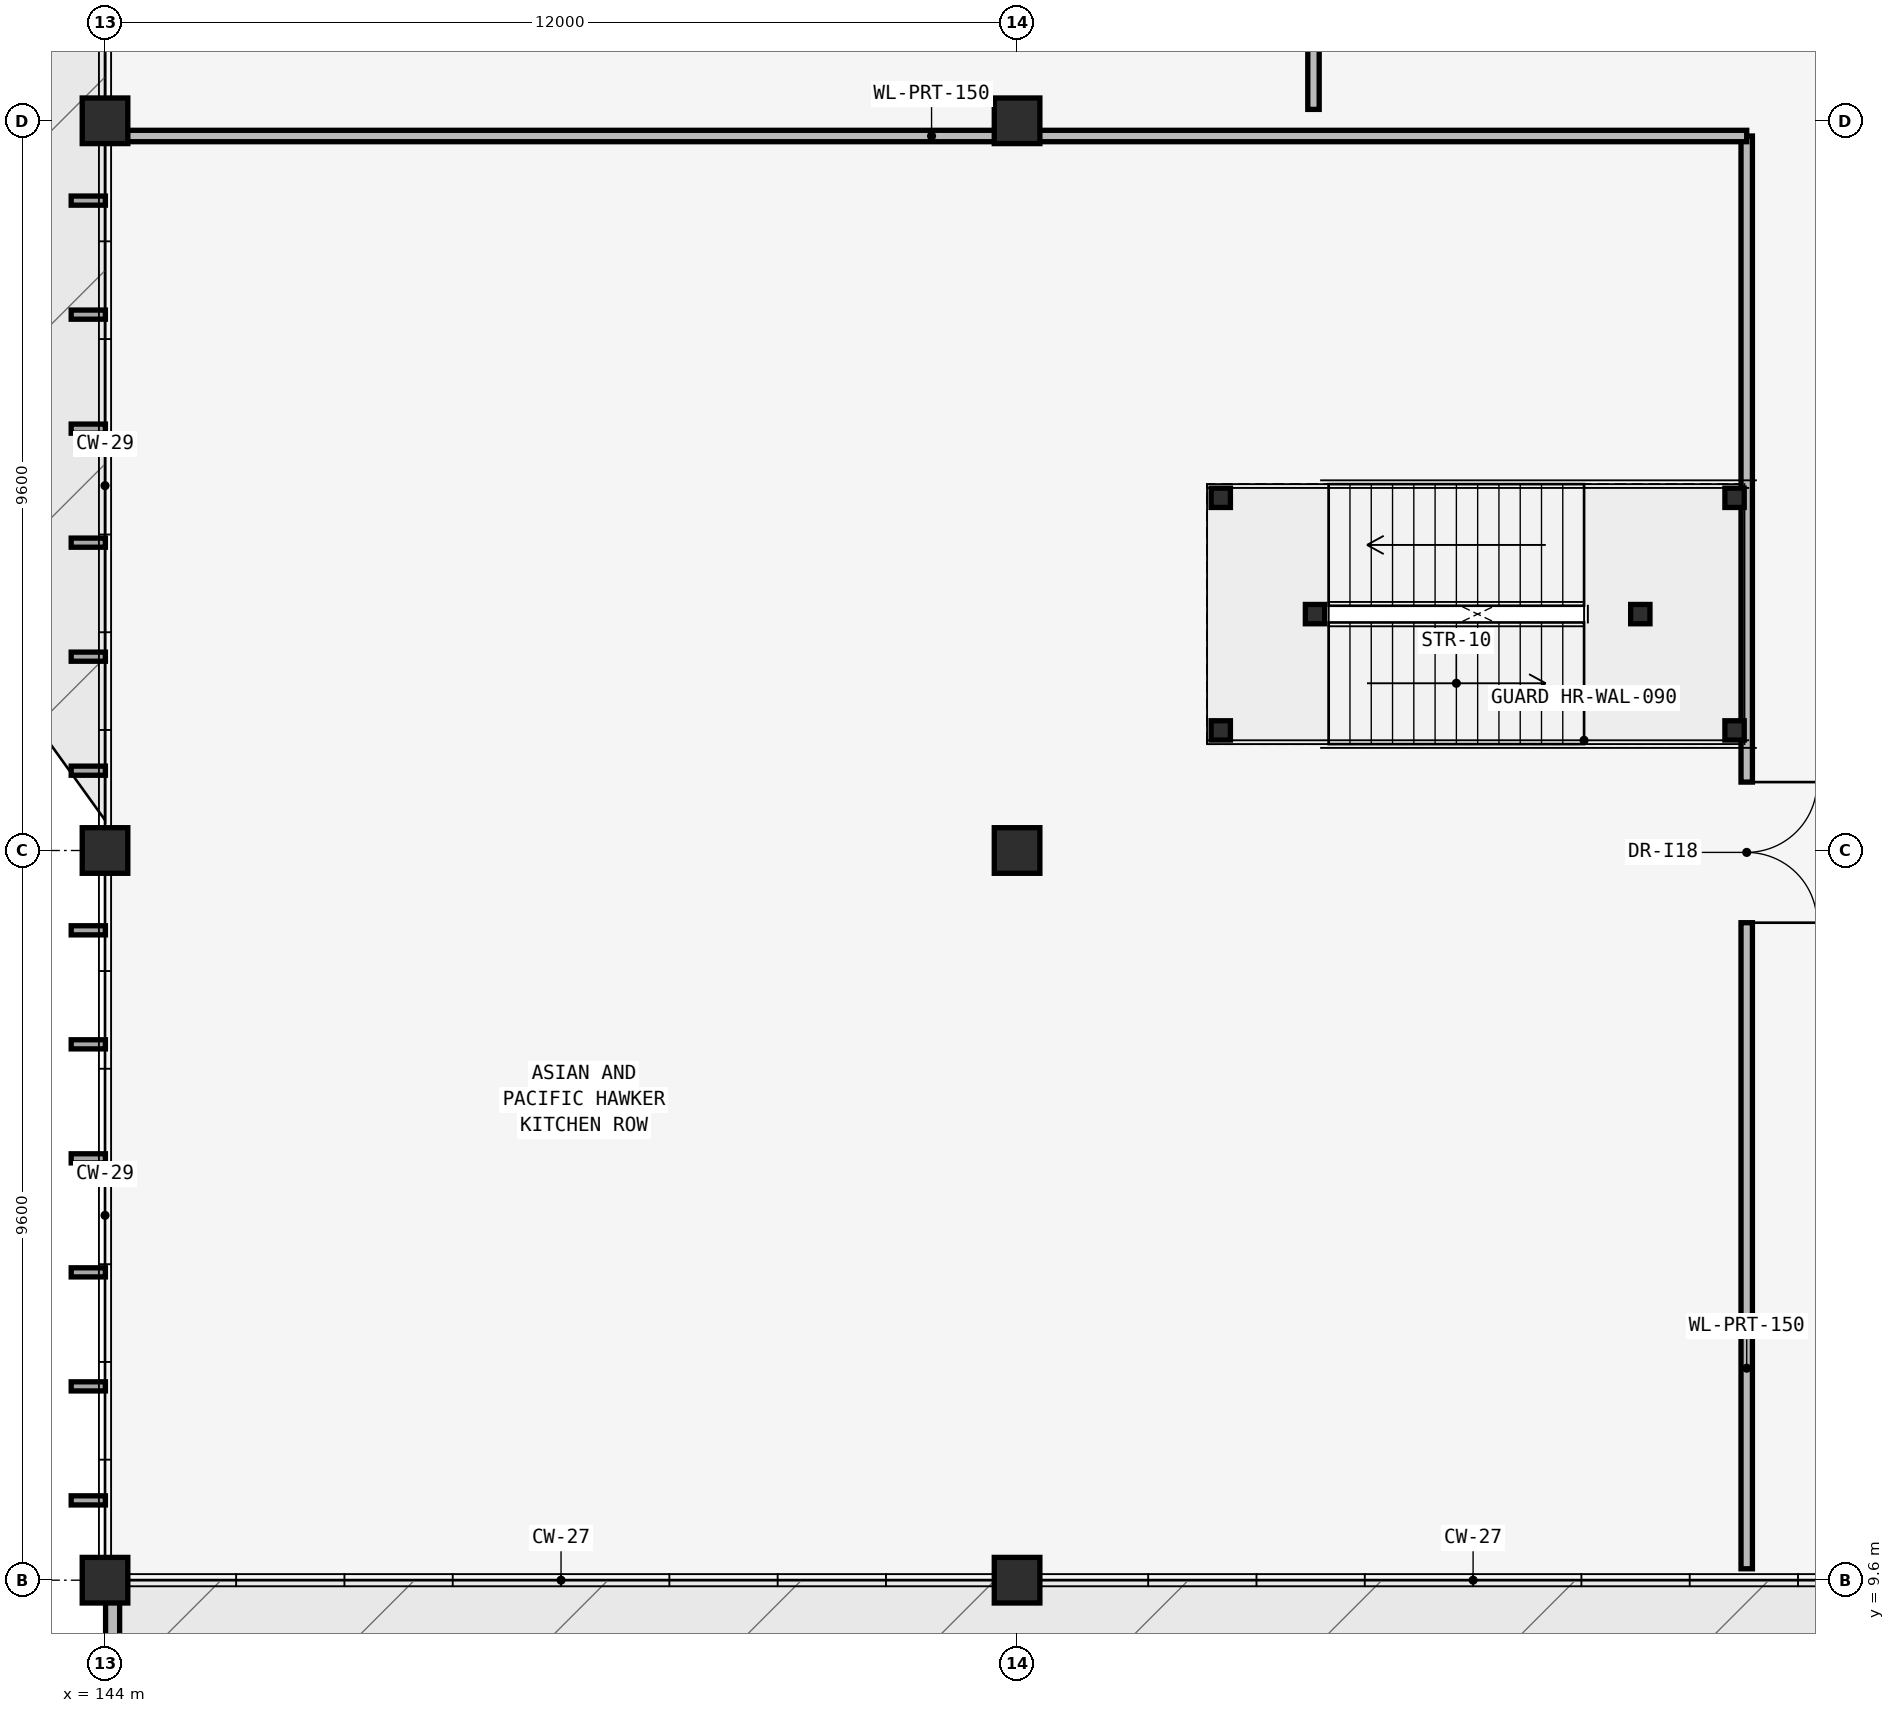
"""IFC4 building model, lengths in metres.
Left out: names, types, materials, properties, quantities, classifications, styles, units other than length and angle.
Written with IfcOpenShell. Run it as: python <this file> out.ifc"""

import sys

from ifc_helpers import new_model, si_unit, direction, frame, frame_2d, origin, origin_2d, place, context, subcontext, project, spatial, rectangle, i_section, extrude, element, fill, save


model = new_model("IFC4")
c1 = context("Model", 3, precision=1e-05, world=origin(), true_north=direction((0.0, 1.0)))
c2 = subcontext(c1, "Body", "Model", "MODEL_VIEW")
j1 = project(units=[si_unit("LENGTHUNIT", "METRE"), si_unit("PLANEANGLEUNIT", "RADIAN")], contexts=[c1])
p1 = place(None, origin())
s1 = spatial("IfcSite", under=j1, at=p1, CompositionType="ELEMENT")
p2 = place(p1, origin())
s2 = spatial("IfcBuilding", under=s1, at=p2, CompositionType="ELEMENT")
p3 = place(p2, frame((0.0, 0.0, 5.4)))
s3 = spatial("IfcBuildingStorey", under=s2, at=p3, CompositionType="ELEMENT", Elevation=5.4)
for number, where, z_axis, x_axis in (
    (1, (144.0, 9.6, 0.0), (0.0, 0.0, 1.0), (1.0, 0.0, 0.0)),
    (2, (144.0, 19.2, 0.0), (0.0, 0.0, 1.0), (1.0, 0.0, 0.0)),
    (3, (144.0, 28.8, 0.0), (0.0, 0.0, 1.0), (1.0, 0.0, 0.0)),
    (4, (156.0, 9.6, 0.0), (0.0, 0.0, 1.0), (1.0, 0.0, 0.0)),
    (5, (156.0, 19.2, 0.0), (0.0, 0.0, 1.0), (1.0, 0.0, 0.0)),
    (6, (156.0, 28.8, 0.0), (0.0, 0.0, 1.0), (1.0, 0.0, 0.0)),
):
    element("IfcColumn", number, at=place(p3, frame(where, z_axis=z_axis, x_axis=x_axis)), inside=s3, PredefinedType="COLUMN", context=c2, shape_type="SweptSolid", body=[
        extrude(rectangle(XDim=0.6, YDim=0.6, at=origin_2d()), origin(), (0.0, 0.0, 1.0), 4.8),
    ])
for number, where, z_axis, x_axis in (
    (7, (165.44, 20.78, 0.0), (0.0, 0.0, 1.0), (1.0, 0.0, 0.0)),
    (8, (165.44, 23.84, 0.0), (0.0, 0.0, 1.0), (1.0, 0.0, 0.0)),
    (9, (164.2, 22.31, 0.0), (0.0, 0.0, 1.0), (1.0, 0.0, 0.0)),
):
    element("IfcColumn", number, at=place(p3, frame(where, z_axis=z_axis, x_axis=x_axis)), inside=s3, PredefinedType="COLUMN", context=c2, shape_type="SweptSolid", body=[
        extrude(i_section(OverallWidth=0.254, OverallDepth=0.254, WebThickness=0.009, FlangeThickness=0.014, at=origin_2d()), origin(), (0.0, 0.0, 1.0), 2.2),
    ])
for number, where, z_axis, x_axis in (
    (10, (158.68, 20.78, 0.0), (0.0, 0.0, 1.0), (1.0, 0.0, 0.0)),
    (11, (158.68, 23.84, 0.0), (0.0, 0.0, 1.0), (1.0, 0.0, 0.0)),
    (12, (159.92, 22.31, 0.0), (0.0, 0.0, 1.0), (1.0, 0.0, 0.0)),
):
    element("IfcColumn", number, at=place(p3, frame(where, z_axis=z_axis, x_axis=x_axis)), inside=s3, PredefinedType="COLUMN", context=c2, shape_type="SweptSolid", body=[
        extrude(i_section(OverallWidth=0.254, OverallDepth=0.254, WebThickness=0.009, FlangeThickness=0.014, at=origin_2d()), origin(), (0.0, 0.0, 1.0), 4.6),
    ])
p4 = place(p3, frame((144.1, 0.1, 0.0), z_axis=(0.0, 0.0, 1.0), x_axis=(0.0, 1.0, 0.0)))
e13 = element("IfcWall", 13, at=p4, inside=s3, PredefinedType="PARAPET", context=c2, shape_type="SweptSolid", body=[
    extrude(rectangle(XDim=9.4, YDim=0.185, at=frame_2d((4.7, 0.0))), origin(), (0.0, 0.0, 1.0), 1.15),
])
p5 = place(p3, frame((165.6, 9.75, 0.0), z_axis=(0.0, 0.0, 1.0), x_axis=(0.0, 1.0, 0.0)))
e14 = element("IfcWall", 14, at=p5, inside=s3, PredefinedType="PARTITIONING", context=c2, shape_type="SweptSolid", body=[
    extrude(rectangle(XDim=18.85, YDim=0.15, at=frame_2d((9.425, 0.0))), origin(), (0.0, 0.0, 1.0), 4.52),
])
p6 = place(p5, frame((8.5, 0.0, 0.0)))
e15 = element("IfcOpeningElement", 15, at=p6, cuts=e14, PredefinedType="OPENING", context=c2, shape_type="SweptSolid", body=[
    extrude(rectangle(XDim=1.85, YDim=2.2, at=frame_2d((0.925, 1.1))), frame((0.0, 0.09, 0.0), z_axis=(0.0, -1.0, 0.0), x_axis=(1.0, 0.0, 0.0)), (0.0, 0.0, 1.0), 0.18),
])
p7 = place(p3, frame((144.15, 28.6, 0.0), z_axis=(0.0, 0.0, 1.0), x_axis=(1.0, 0.0, 0.0)))
e16 = element("IfcWall", 16, at=p7, inside=s3, PredefinedType="PARTITIONING", context=c2, shape_type="SweptSolid", body=[
    extrude(rectangle(XDim=21.45, YDim=0.15, at=frame_2d((10.725, 0.0))), origin(), (0.0, 0.0, 1.0), 4.078),
])
p8 = place(p3, frame((159.9, 28.95, 0.0), z_axis=(0.0, 0.0, 1.0), x_axis=(0.0, 1.0, 0.0)))
e17 = element("IfcWall", 17, at=p8, inside=s3, PredefinedType="PARTITIONING", context=c2, shape_type="SweptSolid", body=[
    extrude(rectangle(XDim=18.85, YDim=0.15, at=frame_2d((9.425, 0.0))), origin(), (0.0, 0.0, 1.0), 4.52),
])
p9 = place(p8, frame((8.5, 0.0, 0.0)))
e18 = element("IfcOpeningElement", 18, at=p9, cuts=e17, PredefinedType="OPENING", context=c2, shape_type="SweptSolid", body=[
    extrude(rectangle(XDim=1.85, YDim=2.2, at=frame_2d((0.925, 1.1))), frame((0.0, 0.09, 0.0), z_axis=(0.0, -1.0, 0.0), x_axis=(1.0, 0.0, 0.0)), (0.0, 0.0, 1.0), 0.18),
])
p10 = place(p6, origin())
e19 = element("IfcDoor", 19, at=p10, inside=s3, OperationType="DOUBLE_DOOR_SINGLE_SWING", PredefinedType="DOOR", context=c2, shape_type="SweptSolid", body=[
    extrude(rectangle(XDim=1.85, YDim=2.2, at=frame_2d((0.925, 1.1))), frame((0.0, 0.025, 0.0), z_axis=(0.0, -1.0, 0.0), x_axis=(1.0, 0.0, 0.0)), (0.0, 0.0, 1.0), 0.05),
])
fill(e15, e19)
save(model, sys.argv[1])
